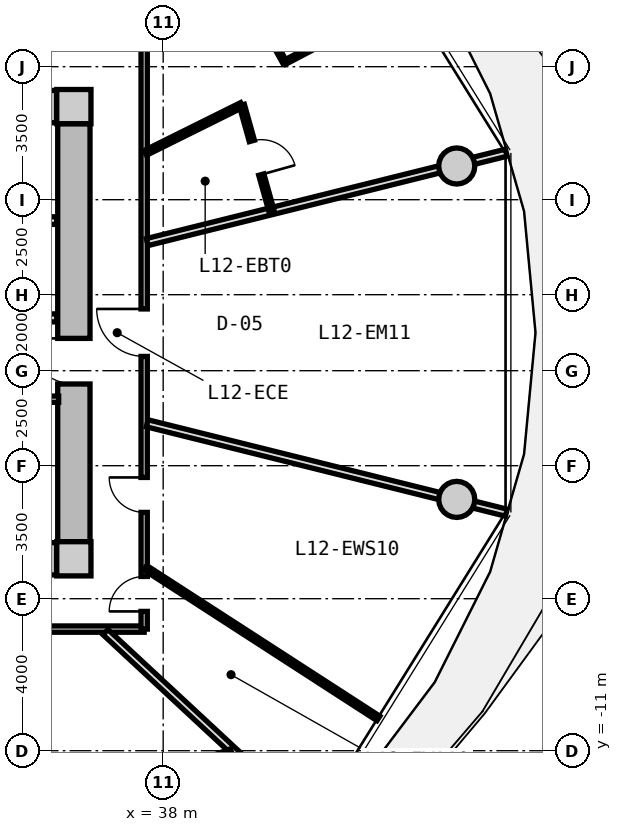
"""IFC4 building model, lengths in metres.
Left out: names, types, materials, properties, quantities, classifications, styles, units other than length and angle.
Written with IfcOpenShell. Run it as: python <this file> out.ifc"""

import sys

from ifc_helpers import new_model, si_unit, direction, frame, frame_2d, origin, origin_2d, place, context, subcontext, project, spatial, rectangle, circle, extrude, source, transform, mapped, element, fill, save


model = new_model("IFC4")
c1 = context("Model", 3, precision=1e-05, world=origin(), true_north=direction((0.0, 1.0)))
c2 = subcontext(c1, "Body", "Model", "MODEL_VIEW")
j1 = project(units=[si_unit("LENGTHUNIT", "METRE"), si_unit("PLANEANGLEUNIT", "RADIAN")], contexts=[c1])
p1 = place(None, origin())
s1 = spatial("IfcSite", under=j1, at=p1, CompositionType="ELEMENT")
p2 = place(p1, origin())
s2 = spatial("IfcBuilding", under=s1, at=p2, CompositionType="ELEMENT")
p3 = place(p2, frame((0.0, 0.0, 42.95)))
s3 = spatial("IfcBuildingStorey", under=s2, at=p3, CompositionType="ELEMENT", Elevation=42.95)
m1 = source(origin(), c2, "Body", "SweptSolid", [
    extrude(rectangle(XDim=0.9, YDim=0.9, at=origin_2d()), origin(), (0.0, 0.0, 1.0), 3.05),
])
for number, where, z_axis, x_axis in (
    (1, (35.65, -5.95, 0.0), (0.0, 0.0, 1.0), (1.0, 0.0, 0.0)),
    (2, (35.65, 5.95, 0.0), (0.0, 0.0, 1.0), (1.0, 0.0, 0.0)),
):
    element("IfcColumn", number, at=place(p3, frame(where, z_axis=z_axis, x_axis=x_axis)), inside=s3, PredefinedType="COLUMN", context=c2, shape_type="MappedRepresentation", body=[
        mapped(m1, transform((0.0, 0.0, 0.0), x_axis=(1.0, 0.0, 0.0), y_axis=(0.0, 1.0, 0.0), z_axis=(0.0, 0.0, 1.0), scale=1.0)),
    ])
m2 = source(origin(), c2, "Body", "SweptSolid", [
    extrude(rectangle(XDim=14.4, YDim=0.85, at=frame_2d((7.2, 0.0))), origin(), (0.0, 0.0, 1.0), 2.79),
])
for number, where, z_axis, x_axis in (
    (3, (20.8, 5.95, 0.0), (0.0, 0.0, 1.0), (1.0, 0.0, 0.0)),
    (4, (35.2, -5.95, 0.0), (0.0, 0.0, 1.0), (-1.0, 0.0, 0.0)),
):
    element("IfcWall", number, at=place(p3, frame(where, z_axis=z_axis, x_axis=x_axis)), inside=s3, PredefinedType="SHEAR", context=c2, shape_type="MappedRepresentation", body=[
        mapped(m2, transform((0.0, 0.0, 0.0), x_axis=(1.0, 0.0, 0.0), y_axis=(0.0, 1.0, 0.0), z_axis=(0.0, 0.0, 1.0), scale=1.0)),
    ])
m3 = source(origin(), c2, "Body", "SweptSolid", [
    extrude(rectangle(XDim=11.0, YDim=0.85, at=frame_2d((5.5, 0.0))), origin(), (0.0, 0.0, 1.0), 2.79),
])
p4 = place(p3, frame((35.65, 5.5, 0.0), z_axis=(0.0, 0.0, 1.0), x_axis=(0.0, -1.0, 0.0)))
e5 = element("IfcWall", 5, at=p4, inside=s3, PredefinedType="SHEAR", context=c2, shape_type="MappedRepresentation", body=[
    mapped(m3, transform((0.0, 0.0, 0.0), x_axis=(1.0, 0.0, 0.0), y_axis=(0.0, 1.0, 0.0), z_axis=(0.0, 0.0, 1.0), scale=1.0)),
])
p5 = place(p4, frame((5.65, 0.0, 0.0)))
e6 = element("IfcOpeningElement", 6, at=p5, cuts=e5, PredefinedType="OPENING", context=c2, shape_type="SweptSolid", body=[
    extrude(rectangle(XDim=1.2, YDim=2.15, at=frame_2d((0.6, 1.075))), frame((0.0, 0.435, 0.0), z_axis=(0.0, -1.0, 0.0), x_axis=(1.0, 0.0, 0.0)), (0.0, 0.0, 1.0), 0.87),
])
m4 = source(origin(), c2, "Body", "SweptSolid", [
    extrude(circle(Radius=0.475, at=origin_2d()), origin(), (0.0, 0.0, 1.0), 3.05),
])
for number, where, z_axis, x_axis in (
    (7, (45.725, 4.387, 0.0), (0.0, 0.0, 1.0), (1.0, 0.0, 0.0)),
    (8, (45.725, -4.387, 0.0), (0.0, 0.0, 1.0), (1.0, 0.0, 0.0)),
):
    element("IfcColumn", number, at=place(p3, frame(where, z_axis=z_axis, x_axis=x_axis)), inside=s3, PredefinedType="COLUMN", context=c2, shape_type="MappedRepresentation", body=[
        mapped(m4, transform((0.0, 0.0, 0.0), x_axis=(1.0, 0.0, 0.0), y_axis=(0.0, 1.0, 0.0), z_axis=(0.0, 0.0, 1.0), scale=1.0)),
    ])
m5 = source(origin(), c2, "Body", "SweptSolid", [
    extrude(rectangle(XDim=3.2, YDim=0.2, at=frame_2d((1.6, 0.0))), origin(), (0.0, 0.0, 1.0), 2.775),
])
p6 = place(p3, frame((32.0, 2.95, 0.0), z_axis=(0.0, 0.0, 1.0), x_axis=(1.0, 0.0, 0.0)))
e9 = element("IfcWall", 9, at=p6, inside=s3, PredefinedType="PARTITIONING", context=c2, shape_type="MappedRepresentation", body=[
    mapped(m5, transform((0.0, 0.0, 0.0), x_axis=(1.0, 0.0, 0.0), y_axis=(0.0, 1.0, 0.0), z_axis=(0.0, 0.0, 1.0), scale=1.0)),
])
m6 = source(origin(), c2, "Body", "SweptSolid", [
    extrude(rectangle(XDim=6.66, YDim=0.21, at=frame_2d((3.33, 0.0))), origin(), (0.0, 0.0, 1.0), 2.775),
])
p7 = place(p3, frame((28.54, 0.39, 0.0), z_axis=(0.0, 0.0, 1.0), x_axis=(1.0, 0.0, 0.0)))
e10 = element("IfcWall", 10, at=p7, inside=s3, PredefinedType="PARTITIONING", context=c2, shape_type="MappedRepresentation", body=[
    mapped(m6, transform((0.0, 0.0, 0.0), x_axis=(1.0, 0.0, 0.0), y_axis=(0.0, 1.0, 0.0), z_axis=(0.0, 0.0, 1.0), scale=1.0)),
])
p8 = place(p7, frame((1.0, 0.0, 0.0)))
e11 = element("IfcOpeningElement", 11, at=p8, cuts=e10, PredefinedType="OPENING", context=c2, shape_type="SweptSolid", body=[
    extrude(rectangle(XDim=1.2, YDim=2.15, at=frame_2d((0.6, 1.075))), frame((0.0, 0.115, 0.0), z_axis=(0.0, -1.0, 0.0), x_axis=(1.0, 0.0, 0.0)), (0.0, 0.0, 1.0), 0.23),
])
m7 = source(origin(), c2, "Body", "SweptSolid", [
    extrude(rectangle(XDim=2.7, YDim=0.165, at=frame_2d((1.35, 0.0))), origin(), (0.0, 0.0, 1.0), 2.775),
])
p9 = place(p3, frame((32.55, -1.75, 0.0), z_axis=(0.0, 0.0, 1.0), x_axis=(1.0, 0.0, 0.0)))
e12 = element("IfcWall", 12, at=p9, inside=s3, PredefinedType="PARTITIONING", context=c2, shape_type="MappedRepresentation", body=[
    mapped(m7, transform((0.0, 0.0, 0.0), x_axis=(1.0, 0.0, 0.0), y_axis=(0.0, 1.0, 0.0), z_axis=(0.0, 0.0, 1.0), scale=1.0)),
])
p10 = place(p9, frame((0.85, 0.0, 0.0)))
e13 = element("IfcOpeningElement", 13, at=p10, cuts=e12, PredefinedType="OPENING", context=c2, shape_type="SweptSolid", body=[
    extrude(rectangle(XDim=0.925, YDim=2.1, at=frame_2d((0.462, 1.05))), frame((0.0, 0.093, 0.0), z_axis=(0.0, -1.0, 0.0), x_axis=(1.0, 0.0, 0.0)), (0.0, 0.0, 1.0), 0.185),
])
m8 = source(origin(), c2, "Body", "SweptSolid", [
    extrude(rectangle(XDim=19.0, YDim=0.165, at=frame_2d((9.5, 0.0))), origin(), (0.0, 0.0, 1.0), 2.775),
])
p11 = place(p3, frame((37.5, -7.8, 0.0), z_axis=(0.0, 0.0, 1.0), x_axis=(-1.0, 0.0, 0.0)))
e14 = element("IfcWall", 14, at=p11, inside=s3, PredefinedType="PARTITIONING", context=c2, shape_type="MappedRepresentation", body=[
    mapped(m8, transform((0.0, 0.0, 0.0), x_axis=(1.0, 0.0, 0.0), y_axis=(0.0, 1.0, 0.0), z_axis=(0.0, 0.0, 1.0), scale=1.0)),
])
p12 = place(p11, frame((7.336, 0.0, 0.0)))
e15 = element("IfcOpeningElement", 15, at=p12, cuts=e14, PredefinedType="OPENING", context=c2, shape_type="SweptSolid", body=[
    extrude(rectangle(XDim=1.05, YDim=2.15, at=frame_2d((0.525, 1.075))), frame((0.0, 0.093, 0.0), z_axis=(0.0, -1.0, 0.0), x_axis=(1.0, 0.0, 0.0)), (0.0, 0.0, 1.0), 0.185),
])
m9 = source(origin(), c2, "Body", "SweptSolid", [
    extrude(rectangle(XDim=15.6, YDim=0.165, at=frame_2d((7.8, 0.0))), origin(), (0.0, 0.0, 1.0), 2.775),
])
p13 = place(p3, frame((37.5, 7.8, 0.0), z_axis=(0.0, 0.0, 1.0), x_axis=(0.0, -1.0, 0.0)))
e16 = element("IfcWall", 16, at=p13, inside=s3, PredefinedType="PARTITIONING", context=c2, shape_type="MappedRepresentation", body=[
    mapped(m9, transform((0.0, 0.0, 0.0), x_axis=(1.0, 0.0, 0.0), y_axis=(0.0, 1.0, 0.0), z_axis=(0.0, 0.0, 1.0), scale=1.0)),
])
p14 = place(p13, frame((14.215, 0.0, 0.0)))
e17 = element("IfcOpeningElement", 17, at=p14, cuts=e16, PredefinedType="OPENING", context=c2, shape_type="SweptSolid", body=[
    extrude(rectangle(XDim=0.92, YDim=2.1, at=frame_2d((0.46, 1.05))), frame((0.0, 0.093, 0.0), z_axis=(0.0, -1.0, 0.0), x_axis=(1.0, 0.0, 0.0)), (0.0, 0.0, 1.0), 0.185),
])
p15 = place(p13, frame((11.609, 0.0, 0.0)))
e18 = element("IfcOpeningElement", 18, at=p15, cuts=e16, PredefinedType="OPENING", context=c2, shape_type="SweptSolid", body=[
    extrude(rectangle(XDim=0.92, YDim=2.1, at=frame_2d((0.46, 1.05))), frame((0.0, 0.093, 0.0), z_axis=(0.0, -1.0, 0.0), x_axis=(1.0, 0.0, 0.0)), (0.0, 0.0, 1.0), 0.185),
])
p16 = place(p13, frame((7.175, 0.0, 0.0)))
e19 = element("IfcOpeningElement", 19, at=p16, cuts=e16, PredefinedType="OPENING", context=c2, shape_type="SweptSolid", body=[
    extrude(rectangle(XDim=1.25, YDim=2.2, at=frame_2d((0.625, 1.1))), frame((0.0, 0.093, 0.0), z_axis=(0.0, -1.0, 0.0), x_axis=(1.0, 0.0, 0.0)), (0.0, 0.0, 1.0), 0.185),
])
m10 = source(origin(), c2, "Body", "SweptSolid", [
    extrude(rectangle(XDim=7.435, YDim=0.19, at=frame_2d((3.717, 0.0))), origin(), (0.0, 0.0, 1.0), 2.225),
])
p17 = place(p3, frame((36.483, -7.88, 0.0), z_axis=(0.0, 0.0, 1.0), x_axis=(0.732651956848, -0.680603489652, 0.0)))
e20 = element("IfcWall", 20, at=p17, inside=s3, PredefinedType="PARTITIONING", context=c2, shape_type="MappedRepresentation", body=[
    mapped(m10, transform((0.0, 0.0, 0.0), x_axis=(1.0, 0.0, 0.0), y_axis=(0.0, 1.0, 0.0), z_axis=(0.0, 0.0, 1.0), scale=1.0)),
])
m11 = source(origin(), c2, "Body", "SweptSolid", [
    extrude(rectangle(XDim=8.32, YDim=0.115, at=frame_2d((4.16, 0.0))), origin(), (0.0, 0.0, 1.0), 2.775),
])
p18 = place(p3, frame((31.997, -13.93, 0.0), z_axis=(0.0, 0.0, 1.0), x_axis=(0.936180763098, 0.351518959382, 0.0)))
e21 = element("IfcWall", 21, at=p18, inside=s3, PredefinedType="PARTITIONING", context=c2, shape_type="MappedRepresentation", body=[
    mapped(m11, transform((0.0, 0.0, 0.0), x_axis=(1.0, 0.0, 0.0), y_axis=(0.0, 1.0, 0.0), z_axis=(0.0, 0.0, 1.0), scale=1.0)),
])
p19 = place(p18, frame((3.685, 0.0, 0.0)))
e22 = element("IfcOpeningElement", 22, at=p19, cuts=e21, PredefinedType="OPENING", context=c2, shape_type="SweptSolid", body=[
    extrude(rectangle(XDim=0.95, YDim=2.1, at=frame_2d((0.475, 1.05))), frame((0.0, 0.067, 0.0), z_axis=(0.0, -1.0, 0.0), x_axis=(1.0, 0.0, 0.0)), (0.0, 0.0, 1.0), 0.135),
])
m12 = source(origin(), c2, "Body", "SweptSolid", [
    extrude(rectangle(XDim=9.737, YDim=0.19, at=frame_2d((4.869, 0.0))), origin(), (0.0, 0.0, 1.0), 2.225),
])
p20 = place(p3, frame((37.58, -2.385, 0.0), z_axis=(0.0, 0.0, 1.0), x_axis=(0.970392716238, -0.241532557375, 0.0)))
e23 = element("IfcWall", 23, at=p20, inside=s3, PredefinedType="PARTITIONING", context=c2, shape_type="MappedRepresentation", body=[
    mapped(m12, transform((0.0, 0.0, 0.0), x_axis=(1.0, 0.0, 0.0), y_axis=(0.0, 1.0, 0.0), z_axis=(0.0, 0.0, 1.0), scale=1.0)),
])
m13 = source(origin(), c2, "Body", "SweptSolid", [
    extrude(rectangle(XDim=7.304, YDim=0.14, at=frame_2d((3.652, 0.0))), origin(), (0.0, 0.0, 1.0), 2.775),
])
p21 = place(p3, frame((37.53, -6.185, 0.0), z_axis=(0.0, 0.0, 1.0), x_axis=(0.83973870965, -0.54299069929, 0.0)))
e24 = element("IfcWall", 24, at=p21, inside=s3, PredefinedType="PARTITIONING", context=c2, shape_type="MappedRepresentation", body=[
    mapped(m13, transform((0.0, 0.0, 0.0), x_axis=(1.0, 0.0, 0.0), y_axis=(0.0, 1.0, 0.0), z_axis=(0.0, 0.0, 1.0), scale=1.0)),
])
m14 = source(origin(), c2, "Body", "SweptSolid", [
    extrude(rectangle(XDim=9.737, YDim=0.19, at=frame_2d((4.869, 0.0))), origin(), (0.0, 0.0, 1.0), 2.415),
])
p22 = place(p3, frame((37.58, 2.385, 0.0), z_axis=(0.0, 0.0, 1.0), x_axis=(0.970392716238, 0.241532557375, 0.0)))
e25 = element("IfcWall", 25, at=p22, inside=s3, PredefinedType="PARTITIONING", context=c2, shape_type="MappedRepresentation", body=[
    mapped(m14, transform((0.0, 0.0, 0.0), x_axis=(1.0, 0.0, 0.0), y_axis=(0.0, 1.0, 0.0), z_axis=(0.0, 0.0, 1.0), scale=1.0)),
])
m15 = source(origin(), c2, "Body", "SweptSolid", [
    extrude(rectangle(XDim=2.834, YDim=0.14, at=frame_2d((1.417, 0.0))), origin(), (0.0, 0.0, 1.0), 2.775),
])
p23 = place(p3, frame((37.53, 4.732, 0.0), z_axis=(0.0, 0.0, 1.0), x_axis=(0.895681174462, 0.444696788513, 0.0)))
e26 = element("IfcWall", 26, at=p23, inside=s3, PredefinedType="PARTITIONING", context=c2, shape_type="MappedRepresentation", body=[
    mapped(m15, transform((0.0, 0.0, 0.0), x_axis=(1.0, 0.0, 0.0), y_axis=(0.0, 1.0, 0.0), z_axis=(0.0, 0.0, 1.0), scale=1.0)),
])
m16 = source(origin(), c2, "Body", "SweptSolid", [
    extrude(rectangle(XDim=2.885, YDim=0.14, at=frame_2d((1.442, 0.0))), origin(), (0.0, 0.0, 1.0), 2.775),
])
p24 = place(p3, frame((40.069, 5.992, 0.0), z_axis=(0.0, 0.0, 1.0), x_axis=(0.269799431837, -0.962916541856, 0.0)))
e27 = element("IfcWall", 27, at=p24, inside=s3, PredefinedType="PARTITIONING", context=c2, shape_type="MappedRepresentation", body=[
    mapped(m16, transform((0.0, 0.0, 0.0), x_axis=(1.0, 0.0, 0.0), y_axis=(0.0, 1.0, 0.0), z_axis=(0.0, 0.0, 1.0), scale=1.0)),
])
p25 = place(p24, frame((0.982, 0.0, 0.0)))
e28 = element("IfcOpeningElement", 28, at=p25, cuts=e27, PredefinedType="OPENING", context=c2, shape_type="SweptSolid", body=[
    extrude(rectangle(XDim=0.92, YDim=2.1, at=frame_2d((0.46, 1.05))), frame((0.0, 0.08, 0.0), z_axis=(0.0, -1.0, 0.0), x_axis=(1.0, 0.0, 0.0)), (0.0, 0.0, 1.0), 0.16),
])
m17 = source(origin(), c2, "Body", "SweptSolid", [
    extrude(rectangle(XDim=3.706, YDim=0.115, at=frame_2d((1.853, 0.0))), origin(), (0.0, 0.0, 1.0), 2.775),
])
p26 = place(p3, frame((41.198, 7.115, 0.0), z_axis=(0.0, 0.0, 1.0), x_axis=(0.88538502503, 0.464858427322, 0.0)))
e29 = element("IfcWall", 29, at=p26, inside=s3, PredefinedType="PARTITIONING", context=c2, shape_type="MappedRepresentation", body=[
    mapped(m17, transform((0.0, 0.0, 0.0), x_axis=(1.0, 0.0, 0.0), y_axis=(0.0, 1.0, 0.0), z_axis=(0.0, 0.0, 1.0), scale=1.0)),
])
m18 = source(origin(), c2, "Body", "SweptSolid", [
    extrude(rectangle(XDim=3.926, YDim=0.115, at=frame_2d((1.963, 0.0))), origin(), (0.0, 0.0, 1.0), 2.775),
])
p27 = place(p3, frame((41.198, 7.115, 0.0), z_axis=(0.0, 0.0, 1.0), x_axis=(-0.483037889915, 0.875599450038, 0.0)))
e30 = element("IfcWall", 30, at=p27, inside=s3, PredefinedType="PARTITIONING", context=c2, shape_type="MappedRepresentation", body=[
    mapped(m18, transform((0.0, 0.0, 0.0), x_axis=(1.0, 0.0, 0.0), y_axis=(0.0, 1.0, 0.0), z_axis=(0.0, 0.0, 1.0), scale=1.0)),
])
p28 = place(p27, frame((1.488, 0.0, 0.0)))
e31 = element("IfcOpeningElement", 31, at=p28, cuts=e30, PredefinedType="OPENING", context=c2, shape_type="SweptSolid", body=[
    extrude(rectangle(XDim=0.95, YDim=2.1, at=frame_2d((0.475, 1.05))), frame((0.0, 0.067, 0.0), z_axis=(0.0, -1.0, 0.0), x_axis=(1.0, 0.0, 0.0)), (0.0, 0.0, 1.0), 0.135),
])
m19 = source(origin(), c2, "Body", "SweptSolid", [
    extrude(rectangle(XDim=1.2, YDim=2.15, at=frame_2d((0.6, 1.075))), frame((0.0, 0.025, 0.0), z_axis=(0.0, -1.0, 0.0), x_axis=(1.0, 0.0, 0.0)), (0.0, 0.0, 1.0), 0.05),
])
p29 = place(p5, frame((1.2, 0.0, 0.0), z_axis=(0.0, 0.0, 1.0), x_axis=(-1.0, 0.0, 0.0)))
e32 = element("IfcDoor", 32, at=p29, inside=s3, OperationType="SINGLE_SWING_RIGHT", PredefinedType="DOOR", context=c2, shape_type="MappedRepresentation", body=[
    mapped(m19, transform((0.0, 0.0, 0.0), x_axis=(1.0, 0.0, 0.0), y_axis=(0.0, 1.0, 0.0), z_axis=(0.0, 0.0, 1.0), scale=1.0)),
])
fill(e6, e32)
m20 = source(origin(), c2, "Body", "SweptSolid", [
    extrude(rectangle(XDim=0.92, YDim=2.1, at=frame_2d((0.46, 1.05))), frame((0.0, 0.025, 0.0), z_axis=(0.0, -1.0, 0.0), x_axis=(1.0, 0.0, 0.0)), (0.0, 0.0, 1.0), 0.05),
])
p30 = place(p14, frame((0.92, 0.0, 0.0), z_axis=(0.0, 0.0, 1.0), x_axis=(-1.0, 0.0, 0.0)))
e33 = element("IfcDoor", 33, at=p30, inside=s3, OperationType="SINGLE_SWING_LEFT", PredefinedType="DOOR", context=c2, shape_type="MappedRepresentation", body=[
    mapped(m20, transform((0.0, 0.0, 0.0), x_axis=(1.0, 0.0, 0.0), y_axis=(0.0, 1.0, 0.0), z_axis=(0.0, 0.0, 1.0), scale=1.0)),
])
fill(e17, e33)
p31 = place(p15, frame((0.92, 0.0, 0.0), z_axis=(0.0, 0.0, 1.0), x_axis=(-1.0, 0.0, 0.0)))
e34 = element("IfcDoor", 34, at=p31, inside=s3, OperationType="SINGLE_SWING_RIGHT", PredefinedType="DOOR", context=c2, shape_type="MappedRepresentation", body=[
    mapped(m20, transform((0.0, 0.0, 0.0), x_axis=(1.0, 0.0, 0.0), y_axis=(0.0, 1.0, 0.0), z_axis=(0.0, 0.0, 1.0), scale=1.0)),
])
fill(e18, e34)
m21 = source(origin(), c2, "Body", "SweptSolid", [
    extrude(rectangle(XDim=1.25, YDim=2.2, at=frame_2d((0.625, 1.1))), frame((0.0, 0.025, 0.0), z_axis=(0.0, -1.0, 0.0), x_axis=(1.0, 0.0, 0.0)), (0.0, 0.0, 1.0), 0.05),
])
p32 = place(p16, frame((1.25, 0.0, 0.0), z_axis=(0.0, 0.0, 1.0), x_axis=(-1.0, 0.0, 0.0)))
e35 = element("IfcDoor", 35, at=p32, inside=s3, OperationType="SINGLE_SWING_RIGHT", PredefinedType="DOOR", context=c2, shape_type="MappedRepresentation", body=[
    mapped(m21, transform((0.0, 0.0, 0.0), x_axis=(1.0, 0.0, 0.0), y_axis=(0.0, 1.0, 0.0), z_axis=(0.0, 0.0, 1.0), scale=1.0)),
])
fill(e19, e35)
p33 = place(p25, origin())
e36 = element("IfcDoor", 36, at=p33, inside=s3, OperationType="SINGLE_SWING_RIGHT", PredefinedType="DOOR", context=c2, shape_type="MappedRepresentation", body=[
    mapped(m20, transform((0.0, 0.0, 0.0), x_axis=(1.0, 0.0, 0.0), y_axis=(0.0, 1.0, 0.0), z_axis=(0.0, 0.0, 1.0), scale=1.0)),
])
fill(e28, e36)
save(model, sys.argv[1])
